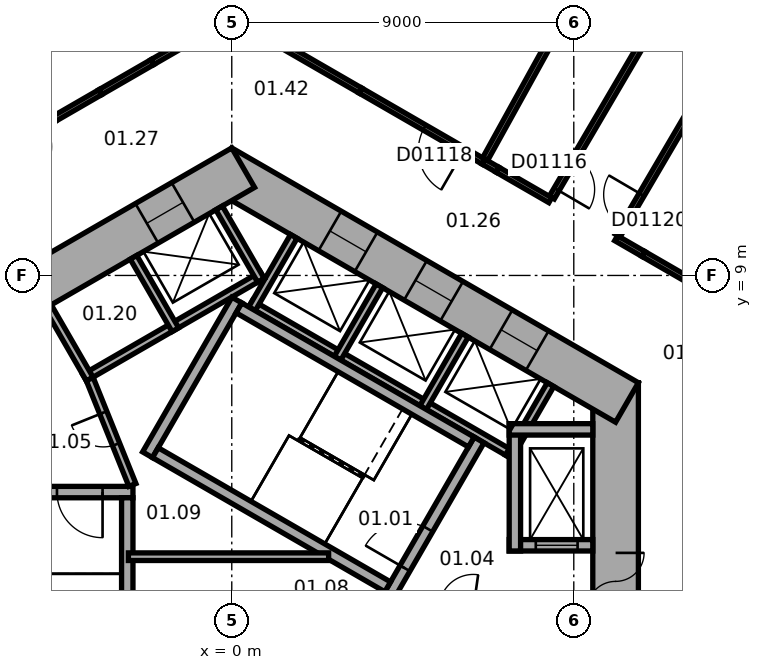
"""IFC4 building model, lengths in metres.
Left out: names, types, materials, properties, quantities, classifications, styles, units other than length and angle.
Written with IfcOpenShell. Run it as: python <this file> out.ifc"""

import sys

from ifc_helpers import new_model, si_unit, direction, frame, frame_2d, origin, place, context, subcontext, project, spatial, rectangle, extrude, element, fill, save


model = new_model("IFC4")
c1 = context("Model", 3, precision=1e-05, world=origin(), true_north=direction((0.0, 1.0)))
c2 = subcontext(c1, "Body", "Model", "MODEL_VIEW")
j1 = project(units=[si_unit("LENGTHUNIT", "METRE"), si_unit("PLANEANGLEUNIT", "RADIAN")], contexts=[c1])
p1 = place(None, origin())
s1 = spatial("IfcSite", under=j1, at=p1, CompositionType="ELEMENT")
p2 = place(p1, origin())
s2 = spatial("IfcBuilding", under=s1, at=p2, CompositionType="ELEMENT")
p3 = place(p2, frame((0.0, 0.0, 7.5)))
s3 = spatial("IfcBuildingStorey", under=s2, at=p3, CompositionType="ELEMENT", Elevation=7.5)
p4 = place(p3, frame((10.1, -6.177, 0.0), z_axis=(0.0, 0.0, 1.0), x_axis=(0.0, 1.0, 0.0)))
e1 = element("IfcWall", 1, at=p4, inside=s3, PredefinedType="SHEAR", context=c2, shape_type="SweptSolid", body=[
    extrude(rectangle(XDim=12.355, YDim=1.2, at=frame_2d((6.177, 0.0))), origin(), (0.0, 0.0, 1.0), 5.5),
])
p5 = place(p4, frame((6.378, 0.0, 0.0)))
e2 = element("IfcOpeningElement", 2, at=p5, cuts=e1, PredefinedType="OPENING", context=c2, shape_type="SweptSolid", body=[
    extrude(rectangle(XDim=1.5, YDim=2.1, at=frame_2d((0.75, 1.05))), frame((0.0, 0.61, 0.0), z_axis=(0.0, -1.0, 0.0), x_axis=(1.0, 0.0, 0.0)), (0.0, 0.0, 1.0), 1.22),
])
p6 = place(p4, frame((1.828, 0.0, 0.0)))
e3 = element("IfcOpeningElement", 3, at=p6, cuts=e1, PredefinedType="OPENING", context=c2, shape_type="SweptSolid", body=[
    extrude(rectangle(XDim=1.1, YDim=2.1, at=frame_2d((0.55, 1.05))), frame((0.0, 0.61, 0.0), z_axis=(0.0, -1.0, 0.0), x_axis=(1.0, 0.0, 0.0)), (0.0, 0.0, 1.0), 1.22),
])
p7 = place(p4, frame((4.427, 0.0, 0.0)))
e4 = element("IfcOpeningElement", 4, at=p7, cuts=e1, PredefinedType="OPENING", context=c2, shape_type="SweptSolid", body=[
    extrude(rectangle(XDim=1.1, YDim=2.1, at=frame_2d((0.55, 1.05))), frame((0.0, 0.61, 0.0), z_axis=(0.0, -1.0, 0.0), x_axis=(1.0, 0.0, 0.0)), (0.0, 0.0, 1.0), 1.22),
])
p8 = place(p3, frame((10.4, 5.658, 0.0), z_axis=(0.0, 0.0, 1.0), x_axis=(-0.866021384402, 0.500006961711, 0.0)))
e5 = element("IfcWall", 5, at=p8, inside=s3, PredefinedType="SHEAR", context=c2, shape_type="SweptSolid", body=[
    extrude(rectangle(XDim=12.355, YDim=1.2, at=frame_2d((6.178, 0.0))), origin(), (0.0, 0.0, 1.0), 5.5),
])
p9 = place(p8, frame((2.728, 0.0, 0.0)))
e6 = element("IfcOpeningElement", 6, at=p9, cuts=e5, PredefinedType="OPENING", context=c2, shape_type="SweptSolid", body=[
    extrude(rectangle(XDim=1.1, YDim=2.1, at=frame_2d((0.55, 1.05))), frame((0.0, 0.61, 0.0), z_axis=(0.0, -1.0, 0.0), x_axis=(1.0, 0.0, 0.0)), (0.0, 0.0, 1.0), 1.22),
])
p10 = place(p8, frame((5.328, 0.0, 0.0)))
e7 = element("IfcOpeningElement", 7, at=p10, cuts=e5, PredefinedType="OPENING", context=c2, shape_type="SweptSolid", body=[
    extrude(rectangle(XDim=1.1, YDim=2.1, at=frame_2d((0.55, 1.05))), frame((0.0, 0.61, 0.0), z_axis=(0.0, -1.0, 0.0), x_axis=(1.0, 0.0, 0.0)), (0.0, 0.0, 1.0), 1.22),
])
p11 = place(p8, frame((7.928, 0.0, 0.0)))
e8 = element("IfcOpeningElement", 8, at=p11, cuts=e5, PredefinedType="OPENING", context=c2, shape_type="SweptSolid", body=[
    extrude(rectangle(XDim=1.1, YDim=2.1, at=frame_2d((0.55, 1.05))), frame((0.0, 0.61, 0.0), z_axis=(0.0, -1.0, 0.0), x_axis=(1.0, 0.0, 0.0)), (0.0, 0.0, 1.0), 1.22),
])
p12 = place(p3, frame((0.3, 11.836, 0.0), z_axis=(0.0, 0.0, 1.0), x_axis=(-0.866021384402, -0.500006961711, 0.0)))
e9 = element("IfcWall", 9, at=p12, inside=s3, PredefinedType="SHEAR", context=c2, shape_type="SweptSolid", body=[
    extrude(rectangle(XDim=12.355, YDim=1.2, at=frame_2d((6.178, 0.0))), origin(), (0.0, 0.0, 1.0), 5.5),
])
p13 = place(p12, frame((6.378, 0.0, 0.0)))
e10 = element("IfcOpeningElement", 10, at=p13, cuts=e9, PredefinedType="OPENING", context=c2, shape_type="SweptSolid", body=[
    extrude(rectangle(XDim=1.5, YDim=2.1, at=frame_2d((0.75, 1.05))), frame((0.0, 0.61, 0.0), z_axis=(0.0, -1.0, 0.0), x_axis=(1.0, 0.0, 0.0)), (0.0, 0.0, 1.0), 1.22),
])
p14 = place(p12, frame((1.828, 0.0, 0.0)))
e11 = element("IfcOpeningElement", 11, at=p14, cuts=e9, PredefinedType="OPENING", context=c2, shape_type="SweptSolid", body=[
    extrude(rectangle(XDim=1.1, YDim=2.1, at=frame_2d((0.55, 1.05))), frame((0.0, 0.61, 0.0), z_axis=(0.0, -1.0, 0.0), x_axis=(1.0, 0.0, 0.0)), (0.0, 0.0, 1.0), 1.22),
])
p15 = place(p3, frame((7.424, 4.259, 0.0), z_axis=(0.0, 0.0, 1.0), x_axis=(-0.866026010844, 0.49999894854, 0.0)))
e12 = element("IfcWall", 12, at=p15, inside=s3, PredefinedType="PARTITIONING", context=c2, shape_type="SweptSolid", body=[
    extrude(rectangle(XDim=8.0, YDim=0.2, at=frame_2d((4.0, 0.0))), origin(), (0.0, 0.0, 1.0), 5.2),
])
for number, where, z_axis, x_axis in (
    (13, (7.287, 4.222, 0.0), (0.0, 0.0, 1.0), (0.5, 0.866, 0.0)),
    (14, (5.036, 5.522, 0.0), (0.0, 0.0, 1.0), (0.5, 0.866, 0.0)),
    (15, (2.784, 6.822, 0.0), (0.0, 0.0, 1.0), (0.5, 0.866, 0.0)),
    (16, (0.532, 8.122, 0.0), (0.0, 0.0, 1.0), (0.5, 0.866, 0.0)),
):
    element("IfcWall", number, at=place(p3, frame(where, z_axis=z_axis, x_axis=x_axis)), inside=s3, PredefinedType="PARTITIONING", context=c2, shape_type="SweptSolid", body=[
        extrude(rectangle(XDim=2.2, YDim=0.2, at=frame_2d((1.1, 0.0))), origin(), (0.0, 0.0, 1.0), 5.2),
    ])
p16 = place(p3, frame((0.803, 9.009, 0.0), z_axis=(0.0, 0.0, 1.0), x_axis=(-0.866028230842, -0.499995103361, 0.0)))
e17 = element("IfcWall", 17, at=p16, inside=s3, PredefinedType="PARTITIONING", context=c2, shape_type="SweptSolid", body=[
    extrude(rectangle(XDim=5.4, YDim=0.2, at=frame_2d((2.7, 0.0))), origin(), (0.0, 0.0, 1.0), 5.2),
])
p17 = place(p3, frame((0.767, 8.872, 0.0), z_axis=(0.0, 0.0, 1.0), x_axis=(-0.499994660107, 0.866028486751, 0.0)))
e18 = element("IfcWall", 18, at=p17, inside=s3, PredefinedType="PARTITIONING", context=c2, shape_type="SweptSolid", body=[
    extrude(rectangle(XDim=2.2, YDim=0.2, at=frame_2d((1.1, 0.0))), origin(), (0.0, 0.0, 1.0), 5.2),
])
for number, where, z_axis, x_axis in (
    (19, (-1.485, 7.572, 0.0), (0.0, 0.0, 1.0), (-0.5, 0.866, 0.0)),
    (20, (-3.737, 6.272, 0.0), (0.0, 0.0, 1.0), (-0.5, 0.866, 0.0)),
):
    element("IfcWall", number, at=place(p3, frame(where, z_axis=z_axis, x_axis=x_axis)), inside=s3, PredefinedType="PARTITIONING", context=c2, shape_type="SweptSolid", body=[
        extrude(rectangle(XDim=2.2, YDim=0.2, at=frame_2d((1.1, 0.0))), origin(), (0.0, 0.0, 1.0), 5.2),
    ])
p18 = place(p3, frame((4.158, 0.602, 0.0), z_axis=(0.0, 0.0, 1.0), x_axis=(0.499977259774, 0.866038532462, 0.0)))
e21 = element("IfcWall", 21, at=p18, inside=s3, PredefinedType="SHEAR", context=c2, shape_type="SweptSolid", body=[
    extrude(rectangle(XDim=4.7, YDim=0.3, at=frame_2d((2.35, 0.0))), origin(), (0.0, 0.0, 1.0), 5.2),
])
p19 = place(p18, frame((0.8, 0.0, 0.0)))
e22 = element("IfcOpeningElement", 22, at=p19, cuts=e21, PredefinedType="OPENING", context=c2, shape_type="SweptSolid", body=[
    extrude(rectangle(XDim=1.2, YDim=2.1, at=frame_2d((0.6, 1.05))), frame((0.0, 0.16, 0.0), z_axis=(0.0, -1.0, 0.0), x_axis=(1.0, 0.0, 0.0)), (0.0, 0.0, 1.0), 0.32),
])
p20 = place(p3, frame((-2.216, 4.282, 0.0), z_axis=(0.0, 0.0, 1.0), x_axis=(0.499977259774, 0.866038532462, 0.0)))
e23 = element("IfcWall", 23, at=p20, inside=s3, PredefinedType="SHEAR", context=c2, shape_type="SweptSolid", body=[
    extrude(rectangle(XDim=4.7, YDim=0.3, at=frame_2d((2.35, 0.0))), origin(), (0.0, 0.0, 1.0), 5.2),
])
for number, where, z_axis, x_axis in (
    (24, (4.103, 0.807, 0.0), (0.0, 0.0, 1.0), (-0.866, 0.5, 0.0)),
    (25, (6.303, 4.617, 0.0), (0.0, 0.0, 1.0), (-0.866, 0.5, 0.0)),
):
    element("IfcWall", number, at=place(p3, frame(where, z_axis=z_axis, x_axis=x_axis)), inside=s3, PredefinedType="SHEAR", context=c2, shape_type="SweptSolid", body=[
        extrude(rectangle(XDim=7.06, YDim=0.3, at=frame_2d((3.53, 0.0))), origin(), (0.0, 0.0, 1.0), 5.2),
    ])
p21 = place(p3, frame((-2.6, 3.3, 0.0), z_axis=(0.0, 0.0, 1.0), x_axis=(-1.0, 0.0, 0.0)))
e26 = element("IfcWall", 26, at=p21, inside=s3, PredefinedType="SHEAR", context=c2, shape_type="SweptSolid", body=[
    extrude(rectangle(XDim=4.7, YDim=0.3, at=frame_2d((2.35, 0.0))), origin(), (0.0, 0.0, 1.0), 5.2),
])
p22 = place(p21, frame((0.8, 0.0, 0.0)))
e27 = element("IfcOpeningElement", 27, at=p22, cuts=e26, PredefinedType="OPENING", context=c2, shape_type="SweptSolid", body=[
    extrude(rectangle(XDim=1.2, YDim=2.1, at=frame_2d((0.6, 1.05))), frame((0.0, 0.16, 0.0), z_axis=(0.0, -1.0, 0.0), x_axis=(1.0, 0.0, 0.0)), (0.0, 0.0, 1.0), 0.32),
])
p23 = place(p3, frame((-2.75, 3.15, 0.0), z_axis=(0.0, 0.0, 1.0), x_axis=(0.0, -1.0, 0.0)))
e28 = element("IfcWall", 28, at=p23, inside=s3, PredefinedType="SHEAR", context=c2, shape_type="SweptSolid", body=[
    extrude(rectangle(XDim=7.06, YDim=0.3, at=frame_2d((3.53, 0.0))), origin(), (0.0, 0.0, 1.0), 5.2),
])
p24 = place(p3, frame((7.3, 1.9, 0.0), z_axis=(0.0, 0.0, 1.0), x_axis=(1.0, 0.0, 0.0)))
e29 = element("IfcWall", 29, at=p24, inside=s3, PredefinedType="SHEAR", context=c2, shape_type="SweptSolid", body=[
    extrude(rectangle(XDim=2.2, YDim=0.3, at=frame_2d((1.1, 0.0))), origin(), (0.0, 0.0, 1.0), 5.2),
])
p25 = place(p24, frame((0.7, 0.0, 0.0)))
e30 = element("IfcOpeningElement", 30, at=p25, cuts=e29, PredefinedType="OPENING", context=c2, shape_type="SweptSolid", body=[
    extrude(rectangle(XDim=1.1, YDim=2.1, at=frame_2d((0.55, 1.05))), frame((0.0, 0.16, 0.0), z_axis=(0.0, -1.0, 0.0), x_axis=(1.0, 0.0, 0.0)), (0.0, 0.0, 1.0), 0.32),
])
p26 = place(p3, frame((7.45, 1.75, 0.0), z_axis=(0.0, 0.0, 1.0), x_axis=(0.0, 1.0, 0.0)))
e31 = element("IfcWall", 31, at=p26, inside=s3, PredefinedType="SHEAR", context=c2, shape_type="SweptSolid", body=[
    extrude(rectangle(XDim=3.35, YDim=0.3, at=frame_2d((1.675, 0.0))), origin(), (0.0, 0.0, 1.0), 5.2),
])
p27 = place(p3, frame((7.3, 4.95, 0.0), z_axis=(0.0, 0.0, 1.0), x_axis=(1.0, 0.0, 0.0)))
e32 = element("IfcWall", 32, at=p27, inside=s3, PredefinedType="SHEAR", context=c2, shape_type="SweptSolid", body=[
    extrude(rectangle(XDim=2.2, YDim=0.3, at=frame_2d((1.1, 0.0))), origin(), (0.0, 0.0, 1.0), 5.2),
])
p28 = place(p3, frame((-2.615, 3.487, 0.0), z_axis=(0.0, 0.0, 1.0), x_axis=(-0.373576831041, 0.92759924068, 0.0)))
e33 = element("IfcWall", 33, at=p28, inside=s3, PredefinedType="PARTITIONING", context=c2, shape_type="SweptSolid", body=[
    extrude(rectangle(XDim=3.002, YDim=0.2, at=frame_2d((1.501, 0.0))), origin(), (0.0, 0.0, 1.0), 5.2),
])
p29 = place(p28, frame((1.15, 0.0, 0.0)))
e34 = element("IfcOpeningElement", 34, at=p29, cuts=e33, PredefinedType="OPENING", context=c2, shape_type="SweptSolid", body=[
    extrude(rectangle(XDim=0.9, YDim=2.1, at=frame_2d((0.45, 1.05))), frame((0.0, 0.11, 0.0), z_axis=(0.0, -1.0, 0.0), x_axis=(1.0, 0.0, 0.0)), (0.0, 0.0, 1.0), 0.22),
])
p30 = place(p3, frame((-2.72, 1.6, 0.0), z_axis=(0.0, 0.0, 1.0), x_axis=(1.0, 0.0, 0.0)))
e35 = element("IfcWall", 35, at=p30, inside=s3, PredefinedType="PARTITIONING", context=c2, shape_type="SweptSolid", body=[
    extrude(rectangle(XDim=5.269, YDim=0.2, at=frame_2d((2.634, 0.0))), origin(), (0.0, 0.0, 1.0), 5.2),
])
p31 = place(p3, frame((10.833, 9.564, 0.0), z_axis=(0.0, 0.0, 1.0), x_axis=(0.866091368387, -0.499885728548, 0.0)))
e36 = element("IfcWall", 36, at=p31, inside=s3, PredefinedType="PARTITIONING", context=c2, shape_type="SweptSolid", body=[
    extrude(rectangle(XDim=2.761, YDim=0.15, at=frame_2d((1.381, 0.0))), origin(), (0.0, 0.0, 1.0), 5.2),
])
p32 = place(p3, frame((10.114, 9.98, 0.0), z_axis=(0.0, 0.0, 1.0), x_axis=(0.865848115047, -0.500306947453, 0.0)))
e37 = element("IfcWall", 37, at=p32, inside=s3, PredefinedType="PARTITIONING", context=c2, shape_type="SweptSolid", body=[
    extrude(rectangle(XDim=0.832, YDim=0.15, at=frame_2d((0.416, 0.0))), origin(), (0.0, 0.0, 1.0), 5.2),
])
p33 = place(p3, frame((8.422, 11.05, 0.0), z_axis=(0.0, 0.0, 1.0), x_axis=(0.50561651199, 0.862758333952, 0.0)))
e38 = element("IfcWall", 38, at=p33, inside=s3, PredefinedType="PARTITIONING", context=c2, shape_type="SweptSolid", body=[
    extrude(rectangle(XDim=7.118, YDim=0.15, at=frame_2d((3.559, 0.0))), origin(), (0.0, 0.0, 1.0), 4.4),
])
p34 = place(p33, frame((0.25, 0.0, 0.0)))
e39 = element("IfcOpeningElement", 39, at=p34, cuts=e38, PredefinedType="OPENING", context=c2, shape_type="SweptSolid", body=[
    extrude(rectangle(XDim=1.0, YDim=2.1, at=frame_2d((0.5, 1.05))), frame((0.0, 0.085, 0.0), z_axis=(0.0, -1.0, 0.0), x_axis=(1.0, 0.0, 0.0)), (0.0, 0.0, 1.0), 0.17),
])
p35 = place(p3, frame((-7.354, 11.573, 0.0), z_axis=(0.0, 0.0, 1.0), x_axis=(0.866051051954, 0.499955573435, 0.0)))
e40 = element("IfcWall", 40, at=p35, inside=s3, PredefinedType="PARTITIONING", context=c2, shape_type="SweptSolid", body=[
    extrude(rectangle(XDim=3.082, YDim=0.15, at=frame_2d((1.541, 0.0))), origin(), (0.0, 0.0, 1.0), 5.2),
])
p36 = place(p35, frame((1.632, 0.0, 0.0)))
e41 = element("IfcOpeningElement", 41, at=p36, cuts=e40, PredefinedType="OPENING", context=c2, shape_type="SweptSolid", body=[
    extrude(rectangle(XDim=1.2, YDim=2.1, at=frame_2d((0.6, 1.05))), frame((0.0, 0.085, 0.0), z_axis=(0.0, -1.0, 0.0), x_axis=(1.0, 0.0, 0.0)), (0.0, 0.0, 1.0), 0.17),
])
p37 = place(p3, frame((6.995, 11.781, 0.0), z_axis=(0.0, 0.0, 1.0), x_axis=(0.866076391369, -0.499911676512, 0.0)))
e42 = element("IfcWall", 42, at=p37, inside=s3, PredefinedType="PARTITIONING", context=c2, shape_type="SweptSolid", body=[
    extrude(rectangle(XDim=1.601, YDim=0.15, at=frame_2d((0.8, 0.0))), origin(), (0.0, 0.0, 1.0), 5.2),
])
p38 = place(p3, frame((6.995, 11.781, 0.0), z_axis=(0.0, 0.0, 1.0), x_axis=(-0.866281716711, 0.49955578997, 0.0)))
e43 = element("IfcWall", 43, at=p38, inside=s3, PredefinedType="PARTITIONING", context=c2, shape_type="SweptSolid", body=[
    extrude(rectangle(XDim=0.423, YDim=0.15, at=frame_2d((0.211, 0.0))), origin(), (0.0, 0.0, 1.0), 5.2),
])
p39 = place(p3, frame((6.629, 11.992, 0.0), z_axis=(0.0, 0.0, 1.0), x_axis=(-0.86599558016, 0.500051652475, 0.0)))
e44 = element("IfcWall", 44, at=p39, inside=s3, PredefinedType="PARTITIONING", context=c2, shape_type="SweptSolid", body=[
    extrude(rectangle(XDim=3.745, YDim=0.15, at=frame_2d((1.872, 0.0))), origin(), (0.0, 0.0, 1.0), 5.2),
])
p40 = place(p39, frame((0.6, 0.0, 0.0)))
e45 = element("IfcOpeningElement", 45, at=p40, cuts=e44, PredefinedType="OPENING", context=c2, shape_type="SweptSolid", body=[
    extrude(rectangle(XDim=1.2, YDim=2.1, at=frame_2d((0.6, 1.05))), frame((0.0, 0.085, 0.0), z_axis=(0.0, -1.0, 0.0), x_axis=(1.0, 0.0, 0.0)), (0.0, 0.0, 1.0), 0.17),
])
p41 = place(p3, frame((6.668, 12.062, 0.0), z_axis=(0.0, 0.0, 1.0), x_axis=(0.483795376692, 0.875181143245, 0.0)))
e46 = element("IfcWall", 46, at=p41, inside=s3, PredefinedType="PARTITIONING", context=c2, shape_type="SweptSolid", body=[
    extrude(rectangle(XDim=7.387, YDim=0.15, at=frame_2d((3.693, 0.0))), origin(), (0.0, 0.0, 1.0), 5.2),
])
p42 = place(p3, frame((-3.46, 13.822, 0.0), z_axis=(0.0, 0.0, 1.0), x_axis=(-0.866004557827, -0.500036104519, 0.0)))
e47 = element("IfcWall", 47, at=p42, inside=s3, PredefinedType="PARTITIONING", context=c2, shape_type="SweptSolid", body=[
    extrude(rectangle(XDim=1.415, YDim=0.15, at=frame_2d((0.708, 0.0))), origin(), (0.0, 0.0, 1.0), 5.2),
])
p43 = place(p3, frame((3.386, 13.865, 0.0), z_axis=(0.0, 0.0, 1.0), x_axis=(-0.866006051527, 0.500033517596, 0.0)))
e48 = element("IfcWall", 48, at=p43, inside=s3, PredefinedType="PARTITIONING", context=c2, shape_type="SweptSolid", body=[
    extrude(rectangle(XDim=3.85, YDim=0.15, at=frame_2d((1.925, 0.0))), origin(), (0.0, 0.0, 1.0), 5.2),
])
p44 = place(p3, frame((-2.087, 14.615, 0.0), z_axis=(0.0, 0.0, 1.0), x_axis=(-0.866054784643, -0.499949107407, 0.0)))
e49 = element("IfcWall", 49, at=p44, inside=s3, PredefinedType="PARTITIONING", context=c2, shape_type="SweptSolid", body=[
    extrude(rectangle(XDim=1.585, YDim=0.15, at=frame_2d((0.792, 0.0))), origin(), (0.0, 0.0, 1.0), 5.2),
])
p45 = place(p3, frame((-2.087, 14.615, 0.0), z_axis=(0.0, 0.0, 1.0), x_axis=(0.866006459158, 0.500032811619, 0.0)))
e50 = element("IfcWall", 50, at=p45, inside=s3, PredefinedType="PARTITIONING", context=c2, shape_type="SweptSolid", body=[
    extrude(rectangle(XDim=1.861, YDim=0.15, at=frame_2d((0.931, 0.0))), origin(), (0.0, 0.0, 1.0), 5.2),
])
p46 = place(p3, frame((13.772, 16.224, 0.0), z_axis=(0.0, 0.0, 1.0), x_axis=(-0.505547889018, -0.862798546539, 0.0)))
e51 = element("IfcWall", 51, at=p46, inside=s3, PredefinedType="PARTITIONING", context=c2, shape_type="SweptSolid", body=[
    extrude(rectangle(XDim=7.156, YDim=0.15, at=frame_2d((3.578, 0.0))), origin(), (0.0, 0.0, 1.0), 5.2),
])
p47 = place(p46, frame((5.906, 0.0, 0.0)))
e52 = element("IfcOpeningElement", 52, at=p47, cuts=e51, PredefinedType="OPENING", context=c2, shape_type="SweptSolid", body=[
    extrude(rectangle(XDim=1.0, YDim=2.1, at=frame_2d((0.5, 1.05))), frame((0.0, 0.085, 0.0), z_axis=(0.0, -1.0, 0.0), x_axis=(1.0, 0.0, 0.0)), (0.0, 0.0, 1.0), 0.17),
])
p48 = place(p5, origin())
e53 = element("IfcDoor", 53, at=p48, inside=s3, OperationType="DOUBLE_DOOR_SINGLE_SWING", PredefinedType="DOOR", context=c2, shape_type="SweptSolid", body=[
    extrude(rectangle(XDim=1.5, YDim=2.1, at=frame_2d((0.75, 1.05))), frame((0.0, 0.025, 0.0), z_axis=(0.0, -1.0, 0.0), x_axis=(1.0, 0.0, 0.0)), (0.0, 0.0, 1.0), 0.05),
])
fill(e2, e53)
p49 = place(p19, origin())
e54 = element("IfcDoor", 54, at=p49, inside=s3, OperationType="SINGLE_SWING_RIGHT", PredefinedType="DOOR", context=c2, shape_type="SweptSolid", body=[
    extrude(rectangle(XDim=1.2, YDim=2.1, at=frame_2d((0.6, 1.05))), frame((0.0, 0.025, 0.0), z_axis=(0.0, -1.0, 0.0), x_axis=(1.0, 0.0, 0.0)), (0.0, 0.0, 1.0), 0.05),
])
fill(e22, e54)
p50 = place(p22, origin())
e55 = element("IfcDoor", 55, at=p50, inside=s3, OperationType="SINGLE_SWING_RIGHT", PredefinedType="DOOR", context=c2, shape_type="SweptSolid", body=[
    extrude(rectangle(XDim=1.2, YDim=2.1, at=frame_2d((0.6, 1.05))), frame((0.0, 0.025, 0.0), z_axis=(0.0, -1.0, 0.0), x_axis=(1.0, 0.0, 0.0)), (0.0, 0.0, 1.0), 0.05),
])
fill(e27, e55)
p51 = place(p29, origin())
e56 = element("IfcDoor", 56, at=p51, inside=s3, OperationType="SINGLE_SWING_LEFT", PredefinedType="DOOR", context=c2, shape_type="SweptSolid", body=[
    extrude(rectangle(XDim=0.9, YDim=2.1, at=frame_2d((0.45, 1.05))), frame((0.0, 0.025, 0.0), z_axis=(0.0, -1.0, 0.0), x_axis=(1.0, 0.0, 0.0)), (0.0, 0.0, 1.0), 0.05),
])
fill(e34, e56)
p52 = place(p25, origin())
e57 = element("IfcDoor", 57, at=p52, inside=s3, OperationType="DOUBLE_DOOR_SLIDING", PredefinedType="DOOR", context=c2, shape_type="SweptSolid", body=[
    extrude(rectangle(XDim=1.1, YDim=2.1, at=frame_2d((0.55, 1.05))), frame((0.0, 0.025, 0.0), z_axis=(0.0, -1.0, 0.0), x_axis=(1.0, 0.0, 0.0)), (0.0, 0.0, 1.0), 0.05),
])
fill(e30, e57)
p53 = place(p9, origin())
e58 = element("IfcDoor", 58, at=p53, inside=s3, OperationType="DOUBLE_DOOR_SLIDING", PredefinedType="DOOR", context=c2, shape_type="SweptSolid", body=[
    extrude(rectangle(XDim=1.1, YDim=2.1, at=frame_2d((0.55, 1.05))), frame((0.0, 0.025, 0.0), z_axis=(0.0, -1.0, 0.0), x_axis=(1.0, 0.0, 0.0)), (0.0, 0.0, 1.0), 0.05),
])
fill(e6, e58)
p54 = place(p10, origin())
e59 = element("IfcDoor", 59, at=p54, inside=s3, OperationType="DOUBLE_DOOR_SLIDING", PredefinedType="DOOR", context=c2, shape_type="SweptSolid", body=[
    extrude(rectangle(XDim=1.1, YDim=2.1, at=frame_2d((0.55, 1.05))), frame((0.0, 0.025, 0.0), z_axis=(0.0, -1.0, 0.0), x_axis=(1.0, 0.0, 0.0)), (0.0, 0.0, 1.0), 0.05),
])
fill(e7, e59)
p55 = place(p11, origin())
e60 = element("IfcDoor", 60, at=p55, inside=s3, OperationType="DOUBLE_DOOR_SLIDING", PredefinedType="DOOR", context=c2, shape_type="SweptSolid", body=[
    extrude(rectangle(XDim=1.1, YDim=2.1, at=frame_2d((0.55, 1.05))), frame((0.0, 0.025, 0.0), z_axis=(0.0, -1.0, 0.0), x_axis=(1.0, 0.0, 0.0)), (0.0, 0.0, 1.0), 0.05),
])
fill(e8, e60)
p56 = place(p14, origin())
e61 = element("IfcDoor", 61, at=p56, inside=s3, OperationType="DOUBLE_DOOR_SLIDING", PredefinedType="DOOR", context=c2, shape_type="SweptSolid", body=[
    extrude(rectangle(XDim=1.1, YDim=2.1, at=frame_2d((0.55, 1.05))), frame((0.0, 0.025, 0.0), z_axis=(0.0, -1.0, 0.0), x_axis=(1.0, 0.0, 0.0)), (0.0, 0.0, 1.0), 0.05),
])
fill(e11, e61)
p57 = place(p34, origin())
e62 = element("IfcDoor", 62, at=p57, inside=s3, OperationType="SINGLE_SWING_LEFT", PredefinedType="DOOR", context=c2, shape_type="SweptSolid", body=[
    extrude(rectangle(XDim=1.0, YDim=2.1, at=frame_2d((0.5, 1.05))), frame((0.0, 0.025, 0.0), z_axis=(0.0, -1.0, 0.0), x_axis=(1.0, 0.0, 0.0)), (0.0, 0.0, 1.0), 0.05),
])
fill(e39, e62)
p58 = place(p40, origin())
e63 = element("IfcDoor", 63, at=p58, inside=s3, OperationType="SINGLE_SWING_LEFT", PredefinedType="DOOR", context=c2, shape_type="SweptSolid", body=[
    extrude(rectangle(XDim=1.2, YDim=2.1, at=frame_2d((0.6, 1.05))), frame((0.0, 0.025, 0.0), z_axis=(0.0, -1.0, 0.0), x_axis=(1.0, 0.0, 0.0)), (0.0, 0.0, 1.0), 0.05),
])
fill(e45, e63)
p59 = place(p47, origin())
e64 = element("IfcDoor", 64, at=p59, inside=s3, OperationType="SINGLE_SWING_LEFT", PredefinedType="DOOR", context=c2, shape_type="SweptSolid", body=[
    extrude(rectangle(XDim=1.0, YDim=2.1, at=frame_2d((0.5, 1.05))), frame((0.0, 0.025, 0.0), z_axis=(0.0, -1.0, 0.0), x_axis=(1.0, 0.0, 0.0)), (0.0, 0.0, 1.0), 0.05),
])
fill(e52, e64)
save(model, sys.argv[1])
